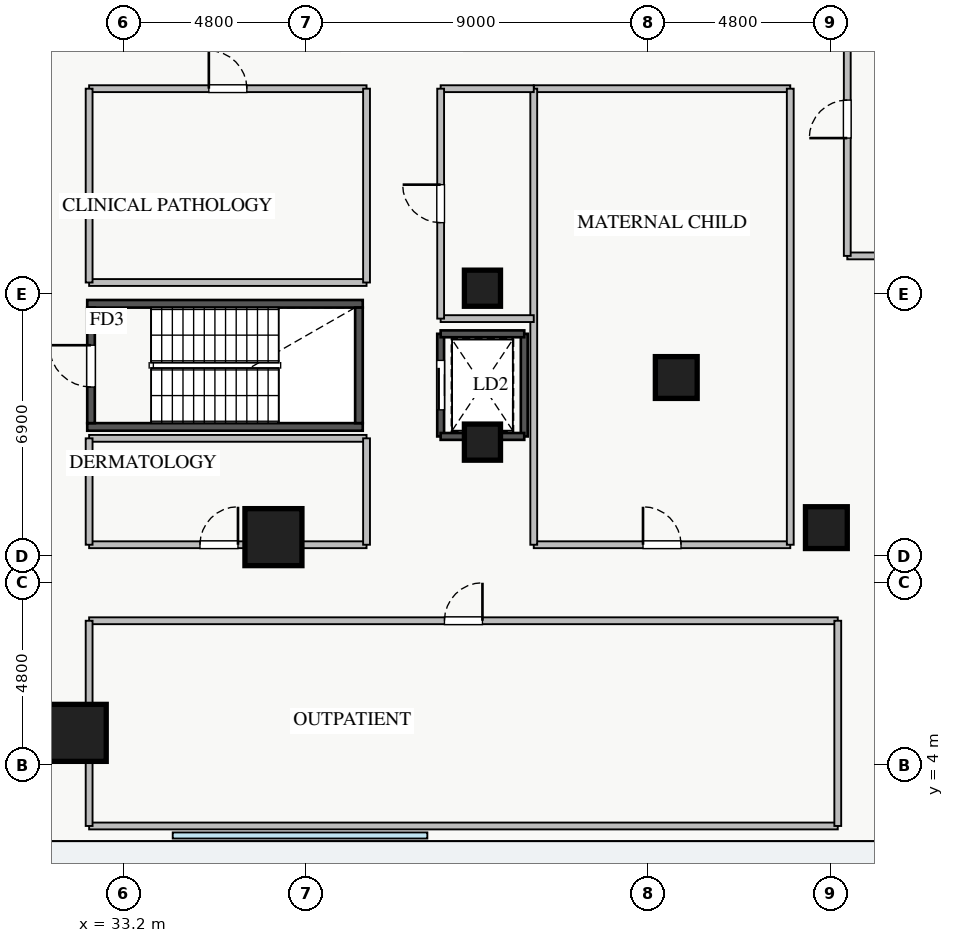
"""IFC4 building model, lengths in metres.
Left out: names, types, materials, properties, quantities, classifications, styles, units other than length and angle.
Written with IfcOpenShell. Run it as: python <this file> out.ifc"""

import sys

from ifc_helpers import new_model, si_unit, direction, frame, frame_2d, origin, origin_2d, place, context, subcontext, project, spatial, rectangle, extrude, source, transform, mapped, element, fill, save


model = new_model("IFC4")
c1 = context("Model", 3, precision=1e-05, world=origin(), true_north=direction((0.0, 1.0)))
c2 = subcontext(c1, "Body", "Model", "MODEL_VIEW")
j1 = project(units=[si_unit("LENGTHUNIT", "METRE"), si_unit("PLANEANGLEUNIT", "RADIAN")], contexts=[c1])
p1 = place(None, origin())
s1 = spatial("IfcSite", under=j1, at=p1, CompositionType="ELEMENT")
p2 = place(p1, origin())
s2 = spatial("IfcBuilding", under=s1, at=p2, CompositionType="ELEMENT")
p3 = place(p2, frame((0.0, 0.0, 5.0)))
s3 = spatial("IfcBuildingStorey", under=s2, at=p3, CompositionType="ELEMENT", Elevation=5.0)
p4 = place(p3, frame((41.55, 12.65, 0.0), z_axis=(0.0, 0.0, 1.0), x_axis=(0.0, 1.0, 0.0)))
e1 = element("IfcWall", 1, at=p4, inside=s3, PredefinedType="SHEAR", context=c2, shape_type="SweptSolid", body=[
    extrude(rectangle(XDim=2.7, YDim=0.18, at=frame_2d((1.35, 0.0))), origin(), (0.0, 0.0, 1.0), 4.18),
])
p5 = place(p4, frame((0.7, 0.0, 0.0)))
e2 = element("IfcOpeningElement", 2, at=p5, cuts=e1, PredefinedType="OPENING", context=c2, shape_type="SweptSolid", body=[
    extrude(rectangle(XDim=1.3, YDim=2.05, at=frame_2d((0.65, 1.025))), frame((0.0, 0.1, 0.0), z_axis=(0.0, -1.0, 0.0), x_axis=(1.0, 0.0, 0.0)), (0.0, 0.0, 1.0), 0.2),
])
p6 = place(p3, frame((43.75, 12.65, 0.0), z_axis=(0.0, 0.0, 1.0), x_axis=(0.0, 1.0, 0.0)))
e3 = element("IfcWall", 3, at=p6, inside=s3, PredefinedType="SHEAR", context=c2, shape_type="SweptSolid", body=[
    extrude(rectangle(XDim=2.7, YDim=0.18, at=frame_2d((1.35, 0.0))), origin(), (0.0, 0.0, 1.0), 4.18),
])
for number, where, z_axis, x_axis in (
    (4, (41.55, 12.65, 0.0), (0.0, 0.0, 1.0), (1.0, 0.0, 0.0)),
    (5, (41.55, 15.35, 0.0), (0.0, 0.0, 1.0), (1.0, 0.0, 0.0)),
):
    element("IfcWall", number, at=place(p3, frame(where, z_axis=z_axis, x_axis=x_axis)), inside=s3, PredefinedType="SHEAR", context=c2, shape_type="SweptSolid", body=[
        extrude(rectangle(XDim=2.2, YDim=0.18, at=frame_2d((1.1, 0.0))), origin(), (0.0, 0.0, 1.0), 4.18),
    ])
for number, where, z_axis, x_axis in (
    (6, (32.25, 12.9, 0.0), (0.0, 0.0, 1.0), (1.0, 0.0, 0.0)),
    (7, (32.25, 16.14, 0.0), (0.0, 0.0, 1.0), (1.0, 0.0, 0.0)),
):
    element("IfcWall", number, at=place(p3, frame(where, z_axis=z_axis, x_axis=x_axis)), inside=s3, PredefinedType="SHEAR", context=c2, shape_type="SweptSolid", body=[
        extrude(rectangle(XDim=7.25, YDim=0.2, at=frame_2d((3.625, 0.0))), origin(), (0.0, 0.0, 1.0), 4.4),
    ])
p7 = place(p3, frame((32.35, 13.0, 0.0), z_axis=(0.0, 0.0, 1.0), x_axis=(0.0, 1.0, 0.0)))
e8 = element("IfcWall", 8, at=p7, inside=s3, PredefinedType="SHEAR", context=c2, shape_type="SweptSolid", body=[
    extrude(rectangle(XDim=3.04, YDim=0.2, at=frame_2d((1.52, 0.0))), origin(), (0.0, 0.0, 1.0), 4.4),
])
p8 = place(p7, frame((0.95, 0.0, 0.0)))
e9 = element("IfcOpeningElement", 9, at=p8, cuts=e8, PredefinedType="OPENING", context=c2, shape_type="SweptSolid", body=[
    extrude(rectangle(XDim=1.1, YDim=2.05, at=frame_2d((0.55, 1.025))), frame((0.0, 0.11, 0.0), z_axis=(0.0, -1.0, 0.0), x_axis=(1.0, 0.0, 0.0)), (0.0, 0.0, 1.0), 0.22),
])
p9 = place(p3, frame((39.4, 13.0, 0.0), z_axis=(0.0, 0.0, 1.0), x_axis=(0.0, 1.0, 0.0)))
e10 = element("IfcWall", 10, at=p9, inside=s3, PredefinedType="SHEAR", context=c2, shape_type="SweptSolid", body=[
    extrude(rectangle(XDim=3.04, YDim=0.2, at=frame_2d((1.52, 0.0))), origin(), (0.0, 0.0, 1.0), 4.4),
])
m1 = source(origin(), c2, "Body", "SweptSolid", [
    extrude(rectangle(XDim=1.5, YDim=1.5, at=origin_2d()), origin(), (0.0, 0.0, 1.0), 4.4),
])
for number, where, z_axis, x_axis in (
    (11, (32.0, 4.85, 0.0), (0.0, 0.0, 1.0), (1.0, 0.0, 0.0)),
    (12, (37.15, 10.0, 0.0), (0.0, 0.0, 1.0), (1.0, 0.0, 0.0)),
):
    element("IfcColumn", number, at=place(p3, frame(where, z_axis=z_axis, x_axis=x_axis)), inside=s3, PredefinedType="COLUMN", context=c2, shape_type="MappedRepresentation", body=[
        mapped(m1, transform((0.0, 0.0, 0.0), x_axis=(1.0, 0.0, 0.0), y_axis=(0.0, 1.0, 0.0), z_axis=(0.0, 0.0, 1.0), scale=1.0)),
    ])
m2 = source(origin(), c2, "Body", "SweptSolid", [
    extrude(rectangle(XDim=1.1, YDim=1.1, at=origin_2d()), origin(), (0.0, 0.0, 1.0), 4.4),
])
for number, where, z_axis, x_axis in (
    (13, (51.7, 10.25, 0.0), (0.0, 0.0, 1.0), (1.0, 0.0, 0.0)),
    (14, (47.75, 14.2, 0.0), (0.0, 0.0, 1.0), (1.0, 0.0, 0.0)),
):
    element("IfcColumn", number, at=place(p3, frame(where, z_axis=z_axis, x_axis=x_axis)), inside=s3, PredefinedType="COLUMN", context=c2, shape_type="MappedRepresentation", body=[
        mapped(m2, transform((0.0, 0.0, 0.0), x_axis=(1.0, 0.0, 0.0), y_axis=(0.0, 1.0, 0.0), z_axis=(0.0, 0.0, 1.0), scale=1.0)),
    ])
m3 = source(origin(), c2, "Body", "SweptSolid", [
    extrude(rectangle(XDim=0.95, YDim=0.95, at=origin_2d()), origin(), (0.0, 0.0, 1.0), 4.4),
])
for number, where, z_axis, x_axis in (
    (15, (42.65, 12.5, 0.0), (0.0, 0.0, 1.0), (1.0, 0.0, 0.0)),
    (16, (42.65, 16.55, 0.0), (0.0, 0.0, 1.0), (1.0, 0.0, 0.0)),
):
    element("IfcColumn", number, at=place(p3, frame(where, z_axis=z_axis, x_axis=x_axis)), inside=s3, PredefinedType="COLUMN", context=c2, shape_type="MappedRepresentation", body=[
        mapped(m3, transform((0.0, 0.0, 0.0), x_axis=(1.0, 0.0, 0.0), y_axis=(0.0, 1.0, 0.0), z_axis=(0.0, 0.0, 1.0), scale=1.0)),
    ])
p10 = place(p3, frame((32.3, 16.7, 0.0), z_axis=(0.0, 0.0, 1.0), x_axis=(1.0, 0.0, 0.0)))
e17 = element("IfcWall", 17, at=p10, inside=s3, PredefinedType="PARTITIONING", context=c2, shape_type="SweptSolid", body=[
    extrude(rectangle(XDim=7.3, YDim=0.18, at=frame_2d((3.65, 0.0))), origin(), (0.0, 0.0, 1.0), 3.475),
])
p11 = place(p3, frame((32.3, 21.8, 0.0), z_axis=(0.0, 0.0, 1.0), x_axis=(1.0, 0.0, 0.0)))
e18 = element("IfcWall", 18, at=p11, inside=s3, PredefinedType="PARTITIONING", context=c2, shape_type="SweptSolid", body=[
    extrude(rectangle(XDim=7.3, YDim=0.18, at=frame_2d((3.65, 0.0))), origin(), (0.0, 0.0, 1.0), 4.18),
])
p12 = place(p11, frame((3.15, 0.0, 0.0)))
e19 = element("IfcOpeningElement", 19, at=p12, cuts=e18, PredefinedType="OPENING", context=c2, shape_type="SweptSolid", body=[
    extrude(rectangle(XDim=1.0, YDim=2.05, at=frame_2d((0.5, 1.025))), frame((0.0, 0.1, 0.0), z_axis=(0.0, -1.0, 0.0), x_axis=(1.0, 0.0, 0.0)), (0.0, 0.0, 1.0), 0.2),
])
for number, where, z_axis, x_axis in (
    (20, (32.3, 16.7, 0.0), (0.0, 0.0, 1.0), (0.0, 1.0, 0.0)),
    (21, (39.6, 16.7, 0.0), (0.0, 0.0, 1.0), (0.0, 1.0, 0.0)),
):
    element("IfcWall", number, at=place(p3, frame(where, z_axis=z_axis, x_axis=x_axis)), inside=s3, PredefinedType="PARTITIONING", context=c2, shape_type="SweptSolid", body=[
        extrude(rectangle(XDim=5.1, YDim=0.18, at=frame_2d((2.55, 0.0))), origin(), (0.0, 0.0, 1.0), 4.18),
    ])
p13 = place(p3, frame((32.3, 9.8, 0.0), z_axis=(0.0, 0.0, 1.0), x_axis=(1.0, 0.0, 0.0)))
e22 = element("IfcWall", 22, at=p13, inside=s3, PredefinedType="PARTITIONING", context=c2, shape_type="SweptSolid", body=[
    extrude(rectangle(XDim=7.3, YDim=0.18, at=frame_2d((3.65, 0.0))), origin(), (0.0, 0.0, 1.0), 4.18),
])
p14 = place(p13, frame((2.917, 0.0, 0.0)))
e23 = element("IfcOpeningElement", 23, at=p14, cuts=e22, PredefinedType="OPENING", context=c2, shape_type="SweptSolid", body=[
    extrude(rectangle(XDim=1.0, YDim=2.05, at=frame_2d((0.5, 1.025))), frame((0.0, 0.1, 0.0), z_axis=(0.0, -1.0, 0.0), x_axis=(1.0, 0.0, 0.0)), (0.0, 0.0, 1.0), 0.2),
])
p15 = place(p3, frame((32.3, 12.6, 0.0), z_axis=(0.0, 0.0, 1.0), x_axis=(1.0, 0.0, 0.0)))
e24 = element("IfcWall", 24, at=p15, inside=s3, PredefinedType="PARTITIONING", context=c2, shape_type="SweptSolid", body=[
    extrude(rectangle(XDim=7.3, YDim=0.18, at=frame_2d((3.65, 0.0))), origin(), (0.0, 0.0, 1.0), 3.325),
])
for number, where, z_axis, x_axis in (
    (25, (32.3, 9.8, 0.0), (0.0, 0.0, 1.0), (0.0, 1.0, 0.0)),
    (26, (39.6, 9.8, 0.0), (0.0, 0.0, 1.0), (0.0, 1.0, 0.0)),
):
    element("IfcWall", number, at=place(p3, frame(where, z_axis=z_axis, x_axis=x_axis)), inside=s3, PredefinedType="PARTITIONING", context=c2, shape_type="SweptSolid", body=[
        extrude(rectangle(XDim=2.8, YDim=0.18, at=frame_2d((1.4, 0.0))), origin(), (0.0, 0.0, 1.0), 4.18),
    ])
p16 = place(p3, frame((44.0, 9.8, 0.0), z_axis=(0.0, 0.0, 1.0), x_axis=(1.0, 0.0, 0.0)))
e27 = element("IfcWall", 27, at=p16, inside=s3, PredefinedType="PARTITIONING", context=c2, shape_type="SweptSolid", body=[
    extrude(rectangle(XDim=6.75, YDim=0.18, at=frame_2d((3.375, 0.0))), origin(), (0.0, 0.0, 1.0), 4.18),
])
p17 = place(p16, frame((2.875, 0.0, 0.0)))
e28 = element("IfcOpeningElement", 28, at=p17, cuts=e27, PredefinedType="OPENING", context=c2, shape_type="SweptSolid", body=[
    extrude(rectangle(XDim=1.0, YDim=2.05, at=frame_2d((0.5, 1.025))), frame((0.0, 0.1, 0.0), z_axis=(0.0, -1.0, 0.0), x_axis=(1.0, 0.0, 0.0)), (0.0, 0.0, 1.0), 0.2),
])
p18 = place(p3, frame((44.0, 21.8, 0.0), z_axis=(0.0, 0.0, 1.0), x_axis=(1.0, 0.0, 0.0)))
e29 = element("IfcWall", 29, at=p18, inside=s3, PredefinedType="PARTITIONING", context=c2, shape_type="SweptSolid", body=[
    extrude(rectangle(XDim=6.75, YDim=0.18, at=frame_2d((3.375, 0.0))), origin(), (0.0, 0.0, 1.0), 4.18),
])
for number, where, z_axis, x_axis in (
    (30, (44.0, 9.8, 0.0), (0.0, 0.0, 1.0), (0.0, 1.0, 0.0)),
    (31, (50.75, 9.8, 0.0), (0.0, 0.0, 1.0), (0.0, 1.0, 0.0)),
):
    element("IfcWall", number, at=place(p3, frame(where, z_axis=z_axis, x_axis=x_axis)), inside=s3, PredefinedType="PARTITIONING", context=c2, shape_type="SweptSolid", body=[
        extrude(rectangle(XDim=12.0, YDim=0.18, at=frame_2d((6.0, 0.0))), origin(), (0.0, 0.0, 1.0), 4.18),
    ])
for number, where, z_axis, x_axis in (
    (32, (41.55, 15.75, 0.0), (0.0, 0.0, 1.0), (1.0, 0.0, 0.0)),
    (33, (41.55, 21.8, 0.0), (0.0, 0.0, 1.0), (1.0, 0.0, 0.0)),
):
    element("IfcWall", number, at=place(p3, frame(where, z_axis=z_axis, x_axis=x_axis)), inside=s3, PredefinedType="PARTITIONING", context=c2, shape_type="SweptSolid", body=[
        extrude(rectangle(XDim=2.45, YDim=0.18, at=frame_2d((1.225, 0.0))), origin(), (0.0, 0.0, 1.0), 4.18),
    ])
p19 = place(p3, frame((41.55, 15.75, 0.0), z_axis=(0.0, 0.0, 1.0), x_axis=(0.0, 1.0, 0.0)))
e34 = element("IfcWall", 34, at=p19, inside=s3, PredefinedType="PARTITIONING", context=c2, shape_type="SweptSolid", body=[
    extrude(rectangle(XDim=6.05, YDim=0.18, at=frame_2d((3.025, 0.0))), origin(), (0.0, 0.0, 1.0), 4.18),
])
p20 = place(p19, frame((2.525, 0.0, 0.0)))
e35 = element("IfcOpeningElement", 35, at=p20, cuts=e34, PredefinedType="OPENING", context=c2, shape_type="SweptSolid", body=[
    extrude(rectangle(XDim=1.0, YDim=2.05, at=frame_2d((0.5, 1.025))), frame((0.0, 0.1, 0.0), z_axis=(0.0, -1.0, 0.0), x_axis=(1.0, 0.0, 0.0)), (0.0, 0.0, 1.0), 0.2),
])
p21 = place(p3, frame((52.25, 17.4, 0.0), z_axis=(0.0, 0.0, 1.0), x_axis=(1.0, 0.0, 0.0)))
e36 = element("IfcWall", 36, at=p21, inside=s3, PredefinedType="PARTITIONING", context=c2, shape_type="SweptSolid", body=[
    extrude(rectangle(XDim=2.05, YDim=0.18, at=frame_2d((1.025, 0.0))), origin(), (0.0, 0.0, 1.0), 4.18),
])
p22 = place(p3, frame((52.25, 17.4, 0.0), z_axis=(0.0, 0.0, 1.0), x_axis=(0.0, 1.0, 0.0)))
e37 = element("IfcWall", 37, at=p22, inside=s3, PredefinedType="PARTITIONING", context=c2, shape_type="SweptSolid", body=[
    extrude(rectangle(XDim=7.2, YDim=0.18, at=frame_2d((3.6, 0.0))), origin(), (0.0, 0.0, 1.0), 4.18),
])
p23 = place(p22, frame((3.1, 0.0, 0.0)))
e38 = element("IfcOpeningElement", 38, at=p23, cuts=e37, PredefinedType="OPENING", context=c2, shape_type="SweptSolid", body=[
    extrude(rectangle(XDim=1.0, YDim=2.05, at=frame_2d((0.5, 1.025))), frame((0.0, 0.1, 0.0), z_axis=(0.0, -1.0, 0.0), x_axis=(1.0, 0.0, 0.0)), (0.0, 0.0, 1.0), 0.2),
])
p24 = place(p3, frame((32.3, 2.4, 0.0), z_axis=(0.0, 0.0, 1.0), x_axis=(1.0, 0.0, 0.0)))
e39 = element("IfcWall", 39, at=p24, inside=s3, PredefinedType="PARTITIONING", context=c2, shape_type="SweptSolid", body=[
    extrude(rectangle(XDim=19.7, YDim=0.18, at=frame_2d((9.85, 0.0))), origin(), (0.0, 0.0, 1.0), 4.18),
])
p25 = place(p3, frame((32.3, 7.8, 0.0), z_axis=(0.0, 0.0, 1.0), x_axis=(1.0, 0.0, 0.0)))
e40 = element("IfcWall", 40, at=p25, inside=s3, PredefinedType="PARTITIONING", context=c2, shape_type="SweptSolid", body=[
    extrude(rectangle(XDim=19.7, YDim=0.18, at=frame_2d((9.85, 0.0))), origin(), (0.0, 0.0, 1.0), 4.18),
])
p26 = place(p25, frame((9.35, 0.0, 0.0)))
e41 = element("IfcOpeningElement", 41, at=p26, cuts=e40, PredefinedType="OPENING", context=c2, shape_type="SweptSolid", body=[
    extrude(rectangle(XDim=1.0, YDim=2.05, at=frame_2d((0.5, 1.025))), frame((0.0, 0.1, 0.0), z_axis=(0.0, -1.0, 0.0), x_axis=(1.0, 0.0, 0.0)), (0.0, 0.0, 1.0), 0.2),
])
for number, where, z_axis, x_axis in (
    (42, (32.3, 2.4, 0.0), (0.0, 0.0, 1.0), (0.0, 1.0, 0.0)),
    (43, (52.0, 2.4, 0.0), (0.0, 0.0, 1.0), (0.0, 1.0, 0.0)),
):
    element("IfcWall", number, at=place(p3, frame(where, z_axis=z_axis, x_axis=x_axis)), inside=s3, PredefinedType="PARTITIONING", context=c2, shape_type="SweptSolid", body=[
        extrude(rectangle(XDim=5.4, YDim=0.18, at=frame_2d((2.7, 0.0))), origin(), (0.0, 0.0, 1.0), 4.18),
    ])
m4 = source(origin(), c2, "Body", "SweptSolid", [
    extrude(rectangle(XDim=1.1, YDim=2.05, at=frame_2d((0.55, 1.025))), frame((0.0, 0.025, 0.0), z_axis=(0.0, -1.0, 0.0), x_axis=(1.0, 0.0, 0.0)), (0.0, 0.0, 1.0), 0.05),
])
p27 = place(p8, origin())
e44 = element("IfcDoor", 44, at=p27, inside=s3, OperationType="SINGLE_SWING_RIGHT", PredefinedType="DOOR", context=c2, shape_type="MappedRepresentation", body=[
    mapped(m4, transform((0.0, 0.0, 0.0), x_axis=(1.0, 0.0, 0.0), y_axis=(0.0, 1.0, 0.0), z_axis=(0.0, 0.0, 1.0), scale=1.0)),
])
fill(e9, e44)
m5 = source(origin(), c2, "Body", "SweptSolid", [
    extrude(rectangle(XDim=1.3, YDim=2.05, at=frame_2d((0.65, 1.025))), frame((0.0, 0.025, 0.0), z_axis=(0.0, -1.0, 0.0), x_axis=(1.0, 0.0, 0.0)), (0.0, 0.0, 1.0), 0.05),
])
p28 = place(p5, origin())
e45 = element("IfcDoor", 45, at=p28, inside=s3, OperationType="SLIDING_TO_LEFT", PredefinedType="DOOR", context=c2, shape_type="MappedRepresentation", body=[
    mapped(m5, transform((0.0, 0.0, 0.0), x_axis=(1.0, 0.0, 0.0), y_axis=(0.0, 1.0, 0.0), z_axis=(0.0, 0.0, 1.0), scale=1.0)),
])
fill(e2, e45)
m6 = source(origin(), c2, "Body", "SweptSolid", [
    extrude(rectangle(XDim=1.0, YDim=2.05, at=frame_2d((0.5, 1.025))), frame((0.0, 0.025, 0.0), z_axis=(0.0, -1.0, 0.0), x_axis=(1.0, 0.0, 0.0)), (0.0, 0.0, 1.0), 0.05),
])
p29 = place(p12, origin())
e46 = element("IfcDoor", 46, at=p29, inside=s3, OperationType="SINGLE_SWING_LEFT", PredefinedType="DOOR", context=c2, shape_type="MappedRepresentation", body=[
    mapped(m6, transform((0.0, 0.0, 0.0), x_axis=(1.0, 0.0, 0.0), y_axis=(0.0, 1.0, 0.0), z_axis=(0.0, 0.0, 1.0), scale=1.0)),
])
fill(e19, e46)
p30 = place(p14, origin())
e47 = element("IfcDoor", 47, at=p30, inside=s3, OperationType="SINGLE_SWING_RIGHT", PredefinedType="DOOR", context=c2, shape_type="MappedRepresentation", body=[
    mapped(m6, transform((0.0, 0.0, 0.0), x_axis=(1.0, 0.0, 0.0), y_axis=(0.0, 1.0, 0.0), z_axis=(0.0, 0.0, 1.0), scale=1.0)),
])
fill(e23, e47)
p31 = place(p17, origin())
e48 = element("IfcDoor", 48, at=p31, inside=s3, OperationType="SINGLE_SWING_LEFT", PredefinedType="DOOR", context=c2, shape_type="MappedRepresentation", body=[
    mapped(m6, transform((0.0, 0.0, 0.0), x_axis=(1.0, 0.0, 0.0), y_axis=(0.0, 1.0, 0.0), z_axis=(0.0, 0.0, 1.0), scale=1.0)),
])
fill(e28, e48)
p32 = place(p20, origin())
e49 = element("IfcDoor", 49, at=p32, inside=s3, OperationType="SINGLE_SWING_RIGHT", PredefinedType="DOOR", context=c2, shape_type="MappedRepresentation", body=[
    mapped(m6, transform((0.0, 0.0, 0.0), x_axis=(1.0, 0.0, 0.0), y_axis=(0.0, 1.0, 0.0), z_axis=(0.0, 0.0, 1.0), scale=1.0)),
])
fill(e35, e49)
p33 = place(p23, origin())
e50 = element("IfcDoor", 50, at=p33, inside=s3, OperationType="SINGLE_SWING_LEFT", PredefinedType="DOOR", context=c2, shape_type="MappedRepresentation", body=[
    mapped(m6, transform((0.0, 0.0, 0.0), x_axis=(1.0, 0.0, 0.0), y_axis=(0.0, 1.0, 0.0), z_axis=(0.0, 0.0, 1.0), scale=1.0)),
])
fill(e38, e50)
p34 = place(p26, origin())
e51 = element("IfcDoor", 51, at=p34, inside=s3, OperationType="SINGLE_SWING_RIGHT", PredefinedType="DOOR", context=c2, shape_type="MappedRepresentation", body=[
    mapped(m6, transform((0.0, 0.0, 0.0), x_axis=(1.0, 0.0, 0.0), y_axis=(0.0, 1.0, 0.0), z_axis=(0.0, 0.0, 1.0), scale=1.0)),
])
fill(e41, e51)
save(model, sys.argv[1])
